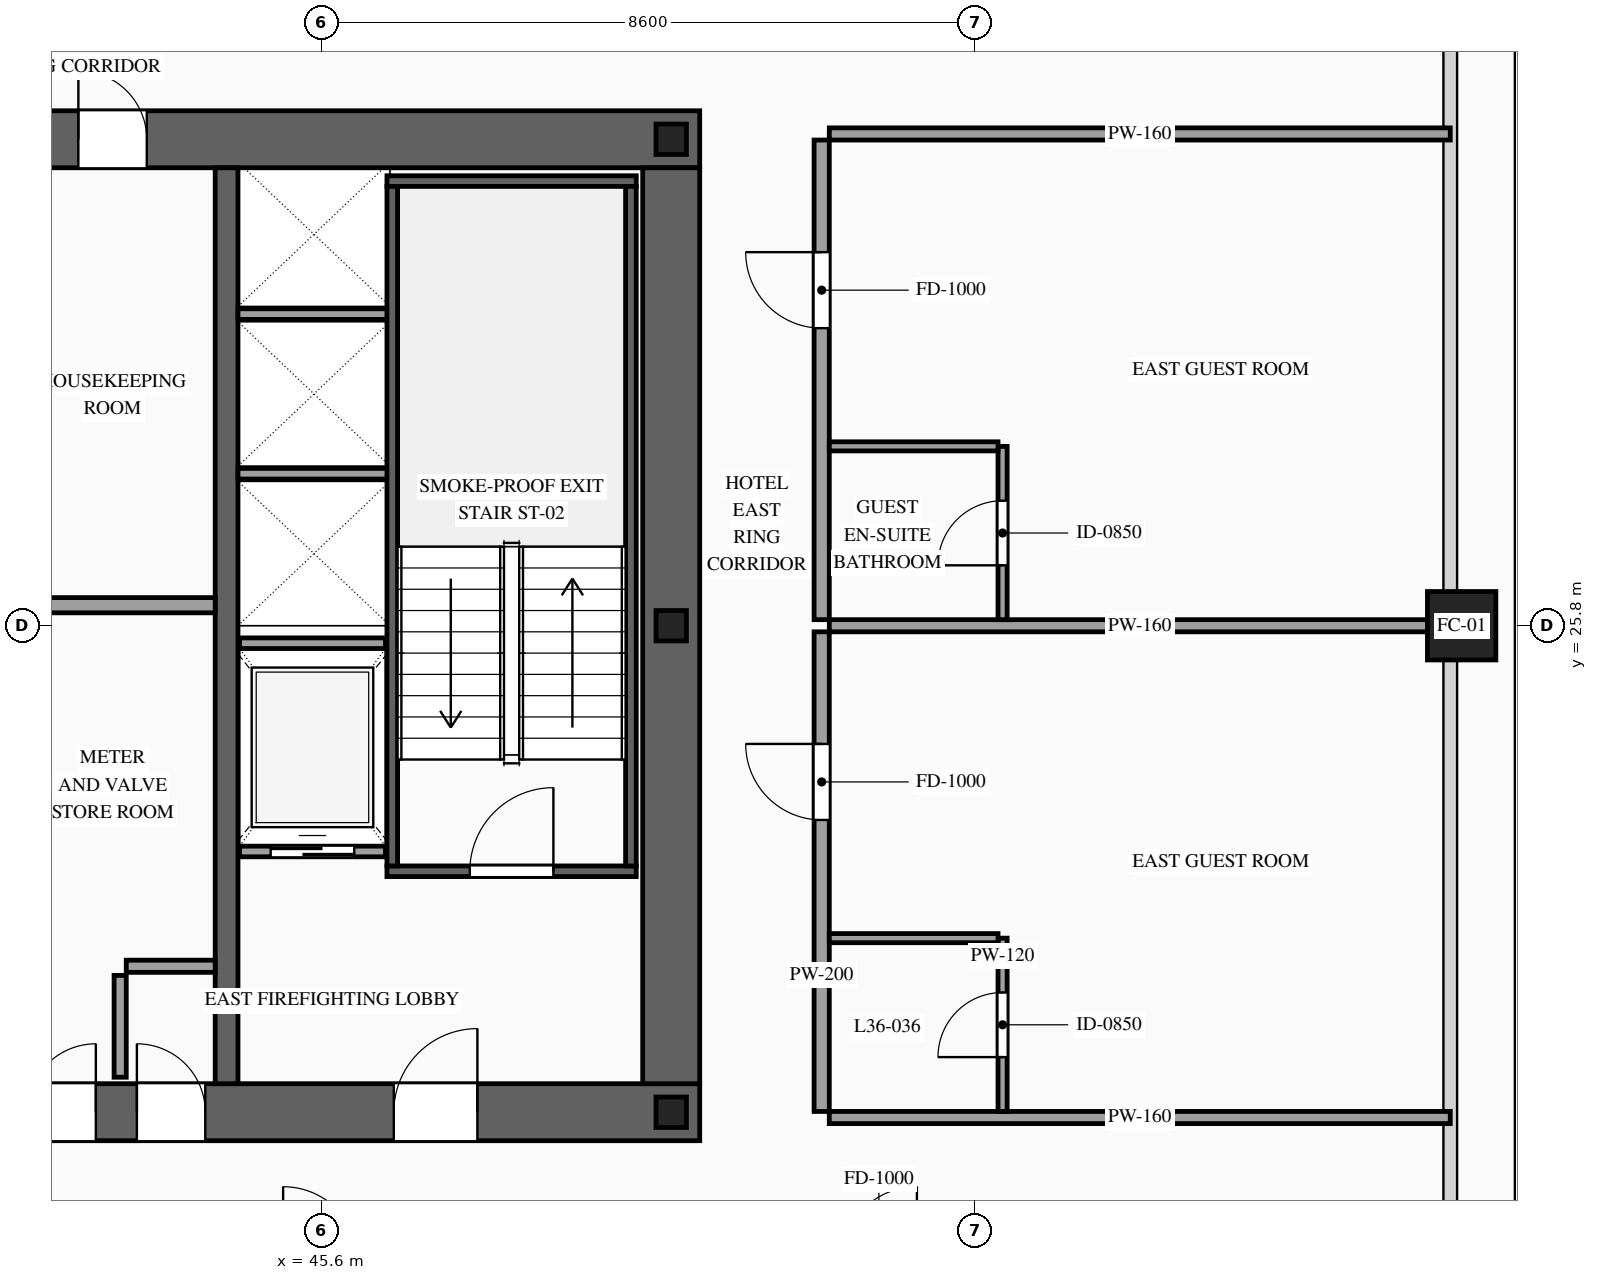
"""IFC4 building model, lengths in metres.
Left out: names, types, materials, properties, quantities, classifications, styles, units other than length and angle.
Written with IfcOpenShell. Run it as: python <this file> out.ifc"""

import sys

from ifc_helpers import new_model, si_unit, direction, frame, frame_2d, origin, origin_2d, place, context, subcontext, project, spatial, rectangle, hollow_rectangle, i_section, extrude, source, transform, mapped, element, fill, save


model = new_model("IFC4")
c1 = context("Model", 3, precision=1e-05, world=origin(), true_north=direction((0.0, 1.0)))
c2 = subcontext(c1, "Body", "Model", "MODEL_VIEW")
j1 = project(units=[si_unit("LENGTHUNIT", "METRE"), si_unit("PLANEANGLEUNIT", "RADIAN")], contexts=[c1])
p1 = place(None, origin())
s1 = spatial("IfcSite", under=j1, at=p1, CompositionType="ELEMENT")
p2 = place(p1, origin())
s2 = spatial("IfcBuilding", under=s1, at=p2, CompositionType="ELEMENT")
p3 = place(p2, frame((0.0, 0.0, 138.0)))
s3 = spatial("IfcBuildingStorey", under=s2, at=p3, CompositionType="ELEMENT", Elevation=138.0)
p4 = place(p3, frame((23.425, 19.4, 0.0), z_axis=(0.0, 0.0, 1.0), x_axis=(1.0, 0.0, 0.0)))
e1 = element("IfcWall", 1, at=p4, inside=s3, PredefinedType="SHEAR", context=c2, shape_type="SweptSolid", body=[
    extrude(rectangle(XDim=27.15, YDim=0.75, at=frame_2d((13.575, 0.0))), origin(), (0.0, 0.0, 1.0), 3.6),
])
p5 = place(p4, frame((2.025, 0.0, 0.0)))
e2 = element("IfcOpeningElement", 2, at=p5, cuts=e1, PredefinedType="OPENING", context=c2, shape_type="SweptSolid", body=[
    extrude(rectangle(XDim=1.1, YDim=2.2, at=frame_2d((0.55, 1.1))), frame((0.0, 0.39, 0.0), z_axis=(0.0, -1.0, 0.0), x_axis=(1.0, 0.0, 0.0)), (0.0, 0.0, 1.0), 0.78),
])
p6 = place(p4, frame((9.925, 0.0, 0.0)))
e3 = element("IfcOpeningElement", 3, at=p6, cuts=e1, PredefinedType="OPENING", context=c2, shape_type="SweptSolid", body=[
    extrude(rectangle(XDim=1.1, YDim=2.2, at=frame_2d((0.55, 1.1))), frame((0.0, 0.39, 0.0), z_axis=(0.0, -1.0, 0.0), x_axis=(1.0, 0.0, 0.0)), (0.0, 0.0, 1.0), 0.78),
])
p7 = place(p4, frame((23.125, 0.0, 0.0)))
e4 = element("IfcOpeningElement", 4, at=p7, cuts=e1, PredefinedType="OPENING", context=c2, shape_type="SweptSolid", body=[
    extrude(rectangle(XDim=1.1, YDim=2.2, at=frame_2d((0.55, 1.1))), frame((0.0, 0.39, 0.0), z_axis=(0.0, -1.0, 0.0), x_axis=(1.0, 0.0, 0.0)), (0.0, 0.0, 1.0), 0.78),
])
p8 = place(p4, frame((19.745, 0.0, 0.0)))
e5 = element("IfcOpeningElement", 5, at=p8, cuts=e1, PredefinedType="OPENING", context=c2, shape_type="SweptSolid", body=[
    extrude(rectangle(XDim=0.9, YDim=2.15, at=frame_2d((0.45, 1.075))), frame((0.0, 0.39, 0.0), z_axis=(0.0, -1.0, 0.0), x_axis=(1.0, 0.0, 0.0)), (0.0, 0.0, 1.0), 0.78),
])
p9 = place(p4, frame((18.305, 0.0, 0.0)))
e6 = element("IfcOpeningElement", 6, at=p9, cuts=e1, PredefinedType="OPENING", context=c2, shape_type="SweptSolid", body=[
    extrude(rectangle(XDim=0.9, YDim=2.15, at=frame_2d((0.45, 1.075))), frame((0.0, 0.39, 0.0), z_axis=(0.0, -1.0, 0.0), x_axis=(1.0, 0.0, 0.0)), (0.0, 0.0, 1.0), 0.78),
])
p10 = place(p3, frame((23.425, 32.2, 0.0), z_axis=(0.0, 0.0, 1.0), x_axis=(1.0, 0.0, 0.0)))
e7 = element("IfcWall", 7, at=p10, inside=s3, PredefinedType="SHEAR", context=c2, shape_type="SweptSolid", body=[
    extrude(rectangle(XDim=27.15, YDim=0.75, at=frame_2d((13.575, 0.0))), origin(), (0.0, 0.0, 1.0), 3.6),
])
p11 = place(p10, frame((4.645, 0.0, 0.0)))
e8 = element("IfcOpeningElement", 8, at=p11, cuts=e7, PredefinedType="OPENING", context=c2, shape_type="SweptSolid", body=[
    extrude(rectangle(XDim=0.9, YDim=2.15, at=frame_2d((0.45, 1.075))), frame((0.0, 0.39, 0.0), z_axis=(0.0, -1.0, 0.0), x_axis=(1.0, 0.0, 0.0)), (0.0, 0.0, 1.0), 0.78),
])
p12 = place(p10, frame((9.925, 0.0, 0.0)))
e9 = element("IfcOpeningElement", 9, at=p12, cuts=e7, PredefinedType="OPENING", context=c2, shape_type="SweptSolid", body=[
    extrude(rectangle(XDim=1.1, YDim=2.2, at=frame_2d((0.55, 1.1))), frame((0.0, 0.39, 0.0), z_axis=(0.0, -1.0, 0.0), x_axis=(1.0, 0.0, 0.0)), (0.0, 0.0, 1.0), 0.78),
])
p13 = place(p10, frame((15.775, 0.0, 0.0)))
e10 = element("IfcOpeningElement", 10, at=p13, cuts=e7, PredefinedType="OPENING", context=c2, shape_type="SweptSolid", body=[
    extrude(rectangle(XDim=1.1, YDim=2.2, at=frame_2d((0.55, 1.1))), frame((0.0, 0.39, 0.0), z_axis=(0.0, -1.0, 0.0), x_axis=(1.0, 0.0, 0.0)), (0.0, 0.0, 1.0), 0.78),
])
p14 = place(p10, frame((18.975, 0.0, 0.0)))
e11 = element("IfcOpeningElement", 11, at=p14, cuts=e7, PredefinedType="OPENING", context=c2, shape_type="SweptSolid", body=[
    extrude(rectangle(XDim=0.9, YDim=2.15, at=frame_2d((0.45, 1.075))), frame((0.0, 0.39, 0.0), z_axis=(0.0, -1.0, 0.0), x_axis=(1.0, 0.0, 0.0)), (0.0, 0.0, 1.0), 0.78),
])
m1 = source(origin(), c2, "Body", "SweptSolid", [
    extrude(rectangle(XDim=12.05, YDim=0.75, at=frame_2d((6.025, 0.0))), origin(), (0.0, 0.0, 1.0), 3.6),
])
p15 = place(p3, frame((50.2, 19.775, 0.0), z_axis=(0.0, 0.0, 1.0), x_axis=(0.0, 1.0, 0.0)))
e12 = element("IfcWall", 12, at=p15, inside=s3, PredefinedType="SHEAR", context=c2, shape_type="MappedRepresentation", body=[
    mapped(m1, transform((0.0, 0.0, 0.0), scale=1.0)),
])
m2 = source(origin(), c2, "Body", "SweptSolid", [
    extrude(rectangle(XDim=12.05, YDim=0.3, at=frame_2d((6.025, 0.0))), origin(), (0.0, 0.0, 1.0), 3.6),
])
p16 = place(p3, frame((44.35, 19.775, 0.0), z_axis=(0.0, 0.0, 1.0), x_axis=(0.0, 1.0, 0.0)))
e13 = element("IfcWall", 13, at=p16, inside=s3, PredefinedType="SOLIDWALL", context=c2, shape_type="MappedRepresentation", body=[
    mapped(m2, transform((0.0, 0.0, 0.0), scale=1.0)),
])
m3 = source(origin(), c2, "Body", "SweptSolid", [
    extrude(i_section(OverallWidth=0.4, OverallDepth=0.4, WebThickness=0.013, FlangeThickness=0.021, at=origin_2d()), origin(), (0.0, 0.0, 1.0), 3.6),
])
for number, where, z_axis, x_axis in (
    (14, (50.2, 19.4, 0.0), (0.0, 0.0, 1.0), (1.0, 0.0, 0.0)),
    (15, (50.2, 25.8, 0.0), (0.0, 0.0, 1.0), (1.0, 0.0, 0.0)),
    (16, (50.2, 32.2, 0.0), (0.0, 0.0, 1.0), (1.0, 0.0, 0.0)),
):
    element("IfcColumn", number, at=place(p3, frame(where, z_axis=z_axis, x_axis=x_axis)), inside=s3, PredefinedType="COLUMN", context=c2, shape_type="MappedRepresentation", body=[
        mapped(m3, transform((0.0, 0.0, 0.0), scale=1.0)),
    ])
m4 = source(origin(), c2, "Body", "SweptSolid", [
    extrude(hollow_rectangle(XDim=0.9, YDim=0.9, WallThickness=0.042, at=origin_2d()), origin(), (0.0, 0.0, 1.0), 3.6),
])
p17 = place(p3, frame((60.6, 25.8, 0.0), z_axis=(0.0, 0.0, 1.0), x_axis=(1.0, 0.0, 0.0)))
e17 = element("IfcColumn", 17, at=p17, inside=s3, PredefinedType="COLUMN", context=c2, shape_type="MappedRepresentation", body=[
    mapped(m4, transform((0.0, 0.0, 0.0), scale=1.0)),
])
p18 = place(p3, frame((44.52, 22.83, 0.0), z_axis=(0.0, 0.0, 1.0), x_axis=(1.0, 0.0, 0.0)))
e18 = element("IfcWall", 18, at=p18, inside=s3, PredefinedType="SOLIDWALL", context=c2, shape_type="SweptSolid", body=[
    extrude(rectangle(XDim=1.92, YDim=0.14, at=frame_2d((0.96, 0.0))), origin(), (0.0, 0.0, 1.0), 3.38),
])
p19 = place(p18, frame((0.41, 0.0, 0.0)))
e19 = element("IfcOpeningElement", 19, at=p19, cuts=e18, PredefinedType="OPENING", context=c2, shape_type="SweptSolid", body=[
    extrude(rectangle(XDim=1.1, YDim=2.2, at=frame_2d((0.55, 1.1))), frame((0.0, 0.085, 0.0), z_axis=(0.0, -1.0, 0.0), x_axis=(1.0, 0.0, 0.0)), (0.0, 0.0, 1.0), 0.17),
])
m5 = source(origin(), c2, "Body", "SweptSolid", [
    extrude(rectangle(XDim=1.92, YDim=0.14, at=frame_2d((0.96, 0.0))), origin(), (0.0, 0.0, 1.0), 3.38),
])
p20 = place(p3, frame((44.52, 25.57, 0.0), z_axis=(0.0, 0.0, 1.0), x_axis=(1.0, 0.0, 0.0)))
e20 = element("IfcWall", 20, at=p20, inside=s3, PredefinedType="SOLIDWALL", context=c2, shape_type="MappedRepresentation", body=[
    mapped(m5, transform((0.0, 0.0, 0.0), scale=1.0)),
])
m6 = source(origin(), c2, "Body", "SweptSolid", [
    extrude(rectangle(XDim=2.0, YDim=0.14, at=frame_2d((1.0, 0.0))), origin(), (0.0, 0.0, 1.0), 3.38),
])
for number, where, z_axis, x_axis in (
    (21, (44.5, 27.8, 0.0), (0.0, 0.0, 1.0), (1.0, 0.0, 0.0)),
    (22, (44.5, 29.9, 0.0), (0.0, 0.0, 1.0), (1.0, 0.0, 0.0)),
):
    element("IfcWall", number, at=place(p3, frame(where, z_axis=z_axis, x_axis=x_axis)), inside=s3, PredefinedType="SOLIDWALL", context=c2, shape_type="MappedRepresentation", body=[
        mapped(m6, transform((0.0, 0.0, 0.0), scale=1.0)),
    ])
p21 = place(p3, frame((46.46, 22.57, 0.0), z_axis=(0.0, 0.0, 1.0), x_axis=(1.0, 0.0, 0.0)))
e23 = element("IfcWall", 23, at=p21, inside=s3, PredefinedType="SOLIDWALL", context=c2, shape_type="SweptSolid", body=[
    extrude(rectangle(XDim=3.28, YDim=0.14, at=frame_2d((1.64, 0.0))), origin(), (0.0, 0.0, 1.0), 3.38),
])
p22 = place(p21, frame((1.09, 0.0, 0.0)))
e24 = element("IfcOpeningElement", 24, at=p22, cuts=e23, PredefinedType="OPENING", context=c2, shape_type="SweptSolid", body=[
    extrude(rectangle(XDim=1.1, YDim=2.2, at=frame_2d((0.55, 1.1))), frame((0.0, 0.085, 0.0), z_axis=(0.0, -1.0, 0.0), x_axis=(1.0, 0.0, 0.0)), (0.0, 0.0, 1.0), 0.17),
])
m7 = source(origin(), c2, "Body", "SweptSolid", [
    extrude(rectangle(XDim=3.28, YDim=0.14, at=frame_2d((1.64, 0.0))), origin(), (0.0, 0.0, 1.0), 3.38),
])
p23 = place(p3, frame((46.46, 31.65, 0.0), z_axis=(0.0, 0.0, 1.0), x_axis=(1.0, 0.0, 0.0)))
e25 = element("IfcWall", 25, at=p23, inside=s3, PredefinedType="SOLIDWALL", context=c2, shape_type="MappedRepresentation", body=[
    mapped(m7, transform((0.0, 0.0, 0.0), scale=1.0)),
])
m8 = source(origin(), c2, "Body", "SweptSolid", [
    extrude(rectangle(XDim=8.94, YDim=0.14, at=frame_2d((4.47, 0.0))), origin(), (0.0, 0.0, 1.0), 3.38),
])
for number, where, z_axis, x_axis in (
    (26, (46.53, 22.64, 0.0), (0.0, 0.0, 1.0), (0.0, 1.0, 0.0)),
    (27, (49.67, 22.64, 0.0), (0.0, 0.0, 1.0), (0.0, 1.0, 0.0)),
):
    element("IfcWall", number, at=place(p3, frame(where, z_axis=z_axis, x_axis=x_axis)), inside=s3, PredefinedType="SOLIDWALL", context=c2, shape_type="MappedRepresentation", body=[
        mapped(m8, transform((0.0, 0.0, 0.0), scale=1.0)),
    ])
m9 = source(origin(), c2, "Body", "SweptSolid", [
    extrude(rectangle(XDim=1.34, YDim=0.16, at=frame_2d((0.67, 0.0))), origin(), (0.0, 0.0, 1.0), 3.38),
])
p24 = place(p3, frame((42.95, 19.86, 0.0), z_axis=(0.0, 0.0, 1.0), x_axis=(0.0, 1.0, 0.0)))
e28 = element("IfcWall", 28, at=p24, inside=s3, PredefinedType="PARTITIONING", context=c2, shape_type="MappedRepresentation", body=[
    mapped(m9, transform((0.0, 0.0, 0.0), scale=1.0)),
])
m10 = source(origin(), c2, "Body", "SweptSolid", [
    extrude(rectangle(XDim=1.17, YDim=0.16, at=frame_2d((0.585, 0.0))), origin(), (0.0, 0.0, 1.0), 3.38),
])
p25 = place(p3, frame((43.03, 21.32, 0.0), z_axis=(0.0, 0.0, 1.0), x_axis=(1.0, 0.0, 0.0)))
e29 = element("IfcWall", 29, at=p25, inside=s3, PredefinedType="PARTITIONING", context=c2, shape_type="MappedRepresentation", body=[
    mapped(m10, transform((0.0, 0.0, 0.0), scale=1.0)),
])
m11 = source(origin(), c2, "Body", "SweptSolid", [
    extrude(rectangle(XDim=2.7, YDim=0.2, at=frame_2d((1.35, 0.0))), origin(), (0.0, 0.0, 1.0), 3.38),
])
p26 = place(p3, frame((41.5, 26.07, 0.0), z_axis=(0.0, 0.0, 1.0), x_axis=(1.0, 0.0, 0.0)))
e30 = element("IfcWall", 30, at=p26, inside=s3, PredefinedType="PARTITIONING", context=c2, shape_type="MappedRepresentation", body=[
    mapped(m11, transform((0.0, 0.0, 0.0), scale=1.0)),
])
p27 = place(p3, frame((52.18, 19.41, 0.0), z_axis=(0.0, 0.0, 1.0), x_axis=(0.0, 1.0, 0.0)))
e31 = element("IfcWall", 31, at=p27, inside=s3, PredefinedType="PARTITIONING", context=c2, shape_type="SweptSolid", body=[
    extrude(rectangle(XDim=6.31, YDim=0.2, at=frame_2d((3.155, 0.0))), origin(), (0.0, 0.0, 1.0), 3.38),
])
p28 = place(p27, frame((3.835, 0.0, 0.0)))
e32 = element("IfcOpeningElement", 32, at=p28, cuts=e31, PredefinedType="OPENING", context=c2, shape_type="SweptSolid", body=[
    extrude(rectangle(XDim=1.0, YDim=2.2, at=frame_2d((0.5, 1.1))), frame((0.0, 0.115, 0.0), z_axis=(0.0, -1.0, 0.0), x_axis=(1.0, 0.0, 0.0)), (0.0, 0.0, 1.0), 0.23),
])
m12 = source(origin(), c2, "Body", "SweptSolid", [
    extrude(rectangle(XDim=8.17, YDim=0.16, at=frame_2d((4.085, 0.0))), origin(), (0.0, 0.0, 1.0), 2.675),
])
p29 = place(p3, frame((52.28, 25.8, 0.0), z_axis=(0.0, 0.0, 1.0), x_axis=(1.0, 0.0, 0.0)))
e33 = element("IfcWall", 33, at=p29, inside=s3, PredefinedType="PARTITIONING", context=c2, shape_type="MappedRepresentation", body=[
    mapped(m12, transform((0.0, 0.0, 0.0), scale=1.0)),
])
m13 = source(origin(), c2, "Body", "SweptSolid", [
    extrude(rectangle(XDim=8.17, YDim=0.16, at=frame_2d((4.085, 0.0))), origin(), (0.0, 0.0, 1.0), 2.875),
])
p30 = place(p3, frame((52.28, 19.33, 0.0), z_axis=(0.0, 0.0, 1.0), x_axis=(1.0, 0.0, 0.0)))
e34 = element("IfcWall", 34, at=p30, inside=s3, PredefinedType="PARTITIONING", context=c2, shape_type="MappedRepresentation", body=[
    mapped(m13, transform((0.0, 0.0, 0.0), scale=1.0)),
])
p31 = place(p3, frame((54.56, 19.41, 0.0), z_axis=(0.0, 0.0, 1.0), x_axis=(0.0, 1.0, 0.0)))
e35 = element("IfcWall", 35, at=p31, inside=s3, PredefinedType="PARTITIONING", context=c2, shape_type="SweptSolid", body=[
    extrude(rectangle(XDim=2.28, YDim=0.12, at=frame_2d((1.14, 0.0))), origin(), (0.0, 0.0, 1.0), 3.38),
])
p32 = place(p31, frame((0.715, 0.0, 0.0)))
e36 = element("IfcOpeningElement", 36, at=p32, cuts=e35, PredefinedType="OPENING", context=c2, shape_type="SweptSolid", body=[
    extrude(rectangle(XDim=0.85, YDim=2.1, at=frame_2d((0.425, 1.05))), frame((0.0, 0.075, 0.0), z_axis=(0.0, -1.0, 0.0), x_axis=(1.0, 0.0, 0.0)), (0.0, 0.0, 1.0), 0.15),
])
m14 = source(origin(), c2, "Body", "SweptSolid", [
    extrude(rectangle(XDim=2.22, YDim=0.12, at=frame_2d((1.11, 0.0))), origin(), (0.0, 0.0, 1.0), 3.38),
])
p33 = place(p3, frame((52.28, 21.69, 0.0), z_axis=(0.0, 0.0, 1.0), x_axis=(1.0, 0.0, 0.0)))
e37 = element("IfcWall", 37, at=p33, inside=s3, PredefinedType="PARTITIONING", context=c2, shape_type="MappedRepresentation", body=[
    mapped(m14, transform((0.0, 0.0, 0.0), scale=1.0)),
])
p34 = place(p3, frame((52.18, 25.88, 0.0), z_axis=(0.0, 0.0, 1.0), x_axis=(0.0, 1.0, 0.0)))
e38 = element("IfcWall", 38, at=p34, inside=s3, PredefinedType="PARTITIONING", context=c2, shape_type="SweptSolid", body=[
    extrude(rectangle(XDim=6.31, YDim=0.2, at=frame_2d((3.155, 0.0))), origin(), (0.0, 0.0, 1.0), 3.38),
])
p35 = place(p34, frame((3.835, 0.0, 0.0)))
e39 = element("IfcOpeningElement", 39, at=p35, cuts=e38, PredefinedType="OPENING", context=c2, shape_type="SweptSolid", body=[
    extrude(rectangle(XDim=1.0, YDim=2.2, at=frame_2d((0.5, 1.1))), frame((0.0, 0.115, 0.0), z_axis=(0.0, -1.0, 0.0), x_axis=(1.0, 0.0, 0.0)), (0.0, 0.0, 1.0), 0.23),
])
p36 = place(p3, frame((52.28, 32.27, 0.0), z_axis=(0.0, 0.0, 1.0), x_axis=(1.0, 0.0, 0.0)))
e40 = element("IfcWall", 40, at=p36, inside=s3, PredefinedType="PARTITIONING", context=c2, shape_type="MappedRepresentation", body=[
    mapped(m13, transform((0.0, 0.0, 0.0), scale=1.0)),
])
p37 = place(p3, frame((54.56, 25.88, 0.0), z_axis=(0.0, 0.0, 1.0), x_axis=(0.0, 1.0, 0.0)))
e41 = element("IfcWall", 41, at=p37, inside=s3, PredefinedType="PARTITIONING", context=c2, shape_type="SweptSolid", body=[
    extrude(rectangle(XDim=2.28, YDim=0.12, at=frame_2d((1.14, 0.0))), origin(), (0.0, 0.0, 1.0), 3.38),
])
p38 = place(p37, frame((0.715, 0.0, 0.0)))
e42 = element("IfcOpeningElement", 42, at=p38, cuts=e41, PredefinedType="OPENING", context=c2, shape_type="SweptSolid", body=[
    extrude(rectangle(XDim=0.85, YDim=2.1, at=frame_2d((0.425, 1.05))), frame((0.0, 0.075, 0.0), z_axis=(0.0, -1.0, 0.0), x_axis=(1.0, 0.0, 0.0)), (0.0, 0.0, 1.0), 0.15),
])
p39 = place(p3, frame((52.28, 28.16, 0.0), z_axis=(0.0, 0.0, 1.0), x_axis=(1.0, 0.0, 0.0)))
e43 = element("IfcWall", 43, at=p39, inside=s3, PredefinedType="PARTITIONING", context=c2, shape_type="MappedRepresentation", body=[
    mapped(m14, transform((0.0, 0.0, 0.0), scale=1.0)),
])
m15 = source(origin(), c2, "Body", "SweptSolid", [
    extrude(rectangle(XDim=1.1, YDim=2.2, at=frame_2d((0.55, 1.1))), frame((0.0, 0.025, 0.0), z_axis=(0.0, -1.0, 0.0), x_axis=(1.0, 0.0, 0.0)), (0.0, 0.0, 1.0), 0.05),
])
p40 = place(p19, origin())
e44 = element("IfcDoor", 44, at=p40, inside=s3, OperationType="SLIDING_TO_RIGHT", PredefinedType="DOOR", context=c2, shape_type="MappedRepresentation", body=[
    mapped(m15, transform((0.0, 0.0, 0.0), scale=1.0)),
])
fill(e19, e44)
m16 = source(origin(), c2, "Body", "SweptSolid", [
    extrude(rectangle(XDim=1.1, YDim=2.2, at=frame_2d((0.55, 1.1))), frame((0.0, 0.025, 0.0), z_axis=(0.0, -1.0, 0.0), x_axis=(1.0, 0.0, 0.0)), (0.0, 0.0, 1.0), 0.05),
])
p41 = place(p22, origin())
e45 = element("IfcDoor", 45, at=p41, inside=s3, OperationType="SINGLE_SWING_RIGHT", PredefinedType="DOOR", context=c2, shape_type="MappedRepresentation", body=[
    mapped(m16, transform((0.0, 0.0, 0.0), scale=1.0)),
])
fill(e24, e45)
p42 = place(p7, origin())
e46 = element("IfcDoor", 46, at=p42, inside=s3, OperationType="SINGLE_SWING_RIGHT", PredefinedType="DOOR", context=c2, shape_type="MappedRepresentation", body=[
    mapped(m16, transform((0.0, 0.0, 0.0), scale=1.0)),
])
fill(e4, e46)
m17 = source(origin(), c2, "Body", "SweptSolid", [
    extrude(rectangle(XDim=0.9, YDim=2.15, at=frame_2d((0.45, 1.075))), frame((0.0, 0.025, 0.0), z_axis=(0.0, -1.0, 0.0), x_axis=(1.0, 0.0, 0.0)), (0.0, 0.0, 1.0), 0.05),
])
p43 = place(p8, origin())
e47 = element("IfcDoor", 47, at=p43, inside=s3, OperationType="SINGLE_SWING_LEFT", PredefinedType="DOOR", context=c2, shape_type="MappedRepresentation", body=[
    mapped(m17, transform((0.0, 0.0, 0.0), scale=1.0)),
])
fill(e5, e47)
p44 = place(p9, origin())
e48 = element("IfcDoor", 48, at=p44, inside=s3, OperationType="SINGLE_SWING_RIGHT", PredefinedType="DOOR", context=c2, shape_type="MappedRepresentation", body=[
    mapped(m17, transform((0.0, 0.0, 0.0), scale=1.0)),
])
fill(e6, e48)
p45 = place(p14, origin())
e49 = element("IfcDoor", 49, at=p45, inside=s3, OperationType="SINGLE_SWING_LEFT", PredefinedType="DOOR", context=c2, shape_type="MappedRepresentation", body=[
    mapped(m17, transform((0.0, 0.0, 0.0), scale=1.0)),
])
fill(e11, e49)
m18 = source(origin(), c2, "Body", "SweptSolid", [
    extrude(rectangle(XDim=1.0, YDim=2.2, at=frame_2d((0.5, 1.1))), frame((0.0, 0.025, 0.0), z_axis=(0.0, -1.0, 0.0), x_axis=(1.0, 0.0, 0.0)), (0.0, 0.0, 1.0), 0.05),
])
p46 = place(p28, origin())
e50 = element("IfcDoor", 50, at=p46, inside=s3, OperationType="SINGLE_SWING_RIGHT", PredefinedType="DOOR", context=c2, shape_type="MappedRepresentation", body=[
    mapped(m18, transform((0.0, 0.0, 0.0), scale=1.0)),
])
fill(e32, e50)
m19 = source(origin(), c2, "Body", "SweptSolid", [
    extrude(rectangle(XDim=0.85, YDim=2.1, at=frame_2d((0.425, 1.05))), frame((0.0, 0.025, 0.0), z_axis=(0.0, -1.0, 0.0), x_axis=(1.0, 0.0, 0.0)), (0.0, 0.0, 1.0), 0.05),
])
p47 = place(p32, origin())
e51 = element("IfcDoor", 51, at=p47, inside=s3, OperationType="SINGLE_SWING_LEFT", PredefinedType="DOOR", context=c2, shape_type="MappedRepresentation", body=[
    mapped(m19, transform((0.0, 0.0, 0.0), scale=1.0)),
])
fill(e36, e51)
p48 = place(p35, origin())
e52 = element("IfcDoor", 52, at=p48, inside=s3, OperationType="SINGLE_SWING_RIGHT", PredefinedType="DOOR", context=c2, shape_type="MappedRepresentation", body=[
    mapped(m18, transform((0.0, 0.0, 0.0), scale=1.0)),
])
fill(e39, e52)
p49 = place(p38, origin())
e53 = element("IfcDoor", 53, at=p49, inside=s3, OperationType="SINGLE_SWING_LEFT", PredefinedType="DOOR", context=c2, shape_type="MappedRepresentation", body=[
    mapped(m19, transform((0.0, 0.0, 0.0), scale=1.0)),
])
fill(e42, e53)
save(model, sys.argv[1])
